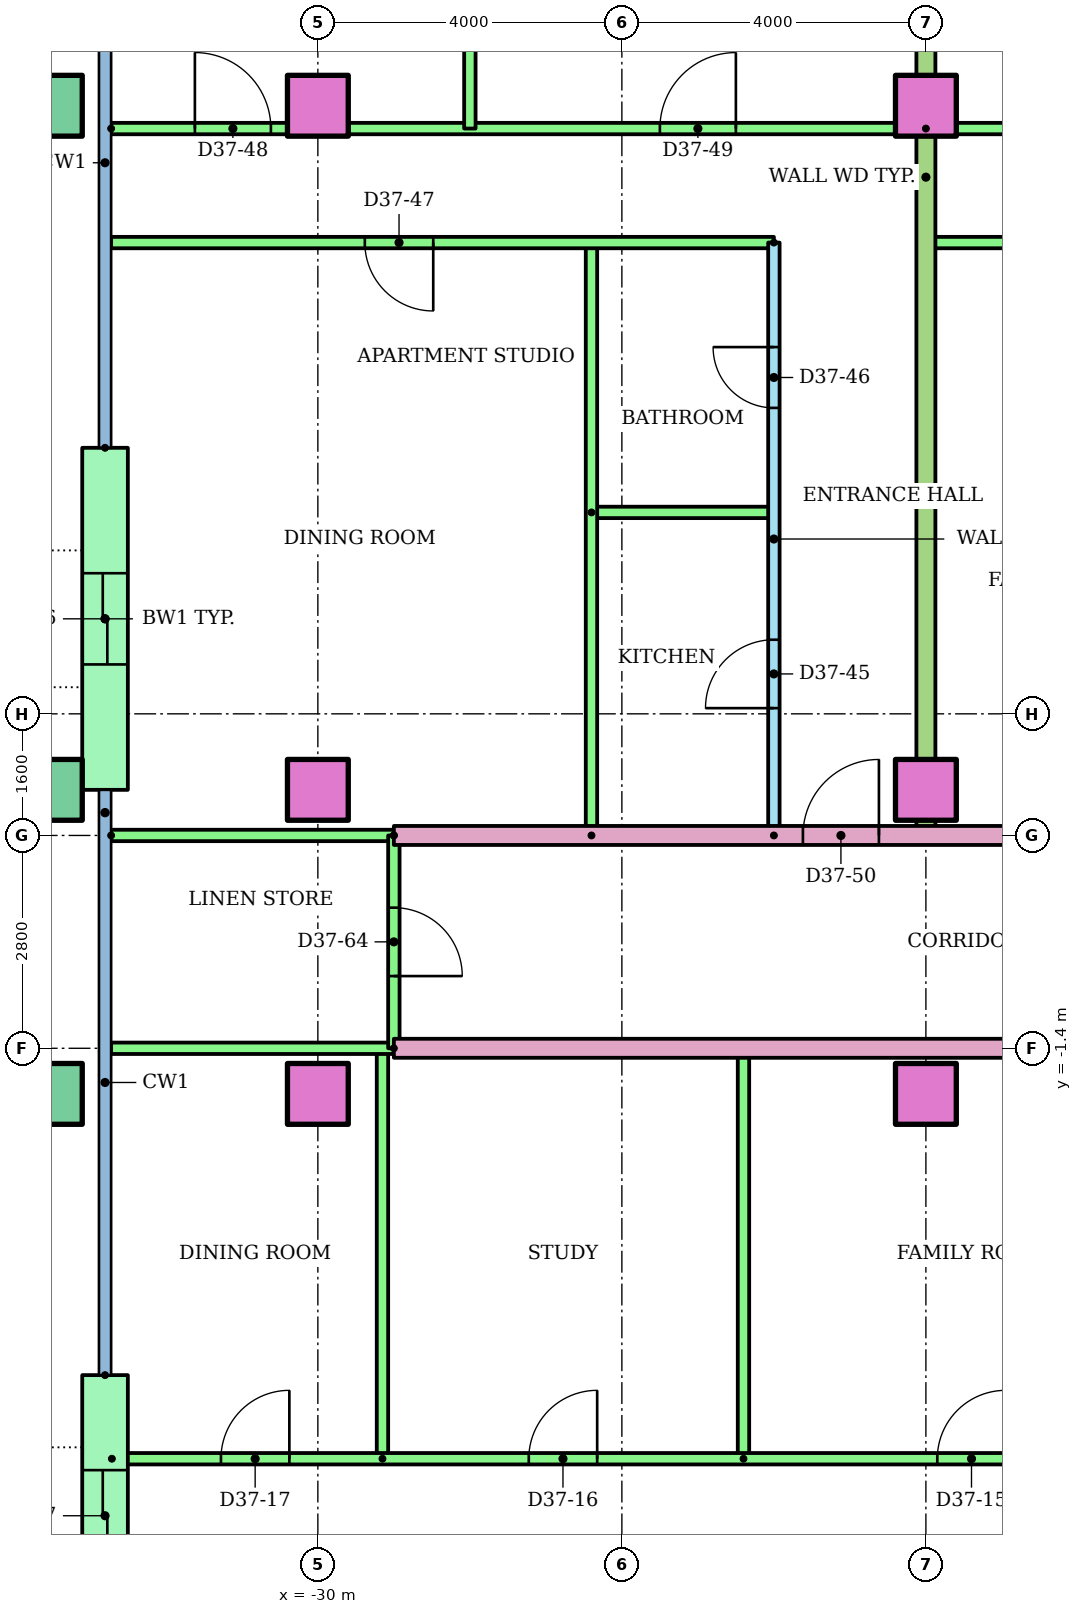
"""IFC4 building model, lengths in metres.
Left out: names, types, materials, properties, quantities, classifications, styles, units other than length and angle.
Written with IfcOpenShell. Run it as: python <this file> out.ifc"""

import sys

from ifc_helpers import new_model, si_unit, direction, frame, frame_2d, origin, origin_2d, place, context, subcontext, project, spatial, rectangle, hollow_rectangle, extrude, element, fill, save


model = new_model("IFC4")
c1 = context("Model", 3, precision=1e-05, world=origin(), true_north=direction((0.0, 1.0)))
c2 = subcontext(c1, "Body", "Model", "MODEL_VIEW")
j1 = project(units=[si_unit("LENGTHUNIT", "METRE"), si_unit("PLANEANGLEUNIT", "RADIAN")], contexts=[c1])
p1 = place(None, origin())
s1 = spatial("IfcSite", under=j1, at=p1, CompositionType="ELEMENT")
p2 = place(p1, origin())
s2 = spatial("IfcBuilding", under=s1, at=p2, CompositionType="ELEMENT")
p3 = place(p2, frame((0.0, 0.0, 142.2)))
s3 = spatial("IfcBuildingStorey", under=s2, at=p3, CompositionType="ELEMENT", Elevation=142.2)
p4 = place(p3, frame((-33.5, -2.0, 0.0)))
e1 = element("IfcColumn", 1, at=p4, inside=s3, PredefinedType="COLUMN", context=c2, shape_type="SweptSolid", body=[
    extrude(hollow_rectangle(XDim=0.8, YDim=0.8, WallThickness=0.04, at=origin_2d()), origin(), (0.0, 0.0, 1.0), 3.2),
])
for number, where in (
    (2, (-30.0, -2.0, 0.0)),
    (3, (-22.0, -2.0, 0.0)),
):
    element("IfcColumn", number, at=place(p3, frame(where)), inside=s3, PredefinedType="COLUMN", context=c2, shape_type="SweptSolid", body=[
        extrude(rectangle(XDim=0.8, YDim=0.8, at=origin_2d()), origin(), (0.0, 0.0, 1.0), 3.2),
    ])
p5 = place(p3, frame((-33.5, 2.0, 0.0)))
e4 = element("IfcColumn", 4, at=p5, inside=s3, PredefinedType="COLUMN", context=c2, shape_type="SweptSolid", body=[
    extrude(hollow_rectangle(XDim=0.8, YDim=0.8, WallThickness=0.04, at=origin_2d()), origin(), (0.0, 0.0, 1.0), 3.2),
])
for number, where in (
    (5, (-30.0, 2.0, 0.0)),
    (6, (-22.0, 2.0, 0.0)),
):
    element("IfcColumn", number, at=place(p3, frame(where)), inside=s3, PredefinedType="COLUMN", context=c2, shape_type="SweptSolid", body=[
        extrude(rectangle(XDim=0.8, YDim=0.8, at=origin_2d()), origin(), (0.0, 0.0, 1.0), 3.2),
    ])
p6 = place(p3, frame((-33.5, 11.0, 0.0)))
e7 = element("IfcColumn", 7, at=p6, inside=s3, PredefinedType="COLUMN", context=c2, shape_type="SweptSolid", body=[
    extrude(hollow_rectangle(XDim=0.8, YDim=0.8, WallThickness=0.04, at=origin_2d()), origin(), (0.0, 0.0, 1.0), 3.2),
])
for number, where in (
    (8, (-30.0, 11.0, 0.0)),
    (9, (-22.0, 11.0, 0.0)),
):
    element("IfcColumn", number, at=place(p3, frame(where)), inside=s3, PredefinedType="COLUMN", context=c2, shape_type="SweptSolid", body=[
        extrude(rectangle(XDim=0.8, YDim=0.8, at=origin_2d()), origin(), (0.0, 0.0, 1.0), 3.2),
    ])
p7 = place(p3, frame((-32.8, 6.5, 0.0), z_axis=(0.0, 0.0, 1.0), x_axis=(0.0, -1.0, 0.0)))
e10 = element("IfcWall", 10, at=p7, inside=s3, PredefinedType="STANDARD", context=c2, shape_type="SweptSolid", body=[
    extrude(rectangle(XDim=4.5, YDim=0.6, at=frame_2d((2.25, 0.0))), origin(), (0.0, 0.0, 1.0), 2.92),
])
p8 = place(p7, frame((1.65, 0.0, 0.0)))
e11 = element("IfcOpeningElement", 11, at=p8, cuts=e10, PredefinedType="OPENING", context=c2, shape_type="SweptSolid", body=[
    extrude(rectangle(XDim=1.2, YDim=2.1, at=frame_2d((0.6, 1.05))), frame((0.0, 0.31, 0.0), z_axis=(0.0, -1.0, 0.0), x_axis=(1.0, 0.0, 0.0)), (0.0, 0.0, 1.0), 0.62),
])
p9 = place(p3, frame((-32.8, -5.7, 0.0), z_axis=(0.0, 0.0, 1.0), x_axis=(0.0, -1.0, 0.0)))
e12 = element("IfcWall", 12, at=p9, inside=s3, PredefinedType="STANDARD", context=c2, shape_type="SweptSolid", body=[
    extrude(rectangle(XDim=3.7, YDim=0.6, at=frame_2d((1.85, 0.0))), origin(), (0.0, 0.0, 1.0), 2.92),
])
p10 = place(p9, frame((1.25, 0.0, 0.0)))
e13 = element("IfcOpeningElement", 13, at=p10, cuts=e12, PredefinedType="OPENING", context=c2, shape_type="SweptSolid", body=[
    extrude(rectangle(XDim=1.2, YDim=2.1, at=frame_2d((0.6, 1.05))), frame((0.0, 0.31, 0.0), z_axis=(0.0, -1.0, 0.0), x_axis=(1.0, 0.0, 0.0)), (0.0, 0.0, 1.0), 0.62),
])
for number, where, z_axis, x_axis in (
    (14, (-24.4, -6.8, 0.0), (0.0, 0.0, 1.0), (0.0, 1.0, 0.0)),
    (15, (-29.15, -6.8, 0.0), (0.0, 0.0, 1.0), (0.0, 1.0, 0.0)),
):
    element("IfcWall", number, at=place(p3, frame(where, z_axis=z_axis, x_axis=x_axis)), inside=s3, PredefinedType="PARTITIONING", context=c2, shape_type="SweptSolid", body=[
        extrude(rectangle(XDim=5.4, YDim=0.15, at=frame_2d((2.7, 0.0))), origin(), (0.0, 0.0, 1.0), 2.4),
    ])
p11 = place(p3, frame((-32.71, -6.8, 0.0)))
e16 = element("IfcWall", 16, at=p11, inside=s3, PredefinedType="PARTITIONING", context=c2, shape_type="SweptSolid", body=[
    extrude(rectangle(XDim=16.71, YDim=0.15, at=frame_2d((8.355, 0.0))), origin(), (0.0, 0.0, 1.0), 2.4),
])
p12 = place(p11, frame((10.86, 0.0, 0.0)))
e17 = element("IfcOpeningElement", 17, at=p12, cuts=e16, PredefinedType="OPENING", context=c2, shape_type="SweptSolid", body=[
    extrude(rectangle(XDim=0.9, YDim=2.1, at=frame_2d((0.45, 1.05))), frame((0.0, 0.085, 0.0), z_axis=(0.0, -1.0, 0.0), x_axis=(1.0, 0.0, 0.0)), (0.0, 0.0, 1.0), 0.17),
])
p13 = place(p11, frame((5.485, 0.0, 0.0)))
e18 = element("IfcOpeningElement", 18, at=p13, cuts=e16, PredefinedType="OPENING", context=c2, shape_type="SweptSolid", body=[
    extrude(rectangle(XDim=0.9, YDim=2.1, at=frame_2d((0.45, 1.05))), frame((0.0, 0.085, 0.0), z_axis=(0.0, -1.0, 0.0), x_axis=(1.0, 0.0, 0.0)), (0.0, 0.0, 1.0), 0.17),
])
p14 = place(p11, frame((1.435, 0.0, 0.0)))
e19 = element("IfcOpeningElement", 19, at=p14, cuts=e16, PredefinedType="OPENING", context=c2, shape_type="SweptSolid", body=[
    extrude(rectangle(XDim=0.9, YDim=2.1, at=frame_2d((0.45, 1.05))), frame((0.0, 0.085, 0.0), z_axis=(0.0, -1.0, 0.0), x_axis=(1.0, 0.0, 0.0)), (0.0, 0.0, 1.0), 0.17),
])
p15 = place(p3, frame((-14.0, -1.4, 0.0), z_axis=(0.0, 0.0, 1.0), x_axis=(-1.0, 0.0, 0.0)))
e20 = element("IfcWall", 20, at=p15, inside=s3, PredefinedType="PARTITIONING", context=c2, shape_type="SweptSolid", body=[
    extrude(rectangle(XDim=15.0, YDim=0.25, at=frame_2d((7.5, 0.0))), origin(), (0.0, 0.0, 1.0), 2.4),
])
p16 = place(p15, frame((0.618, 0.0, 0.0)))
e21 = element("IfcOpeningElement", 21, at=p16, cuts=e20, PredefinedType="OPENING", context=c2, shape_type="SweptSolid", body=[
    extrude(rectangle(XDim=1.0, YDim=2.1, at=frame_2d((0.5, 1.05))), frame((0.0, 0.135, 0.0), z_axis=(0.0, -1.0, 0.0), x_axis=(1.0, 0.0, 0.0)), (0.0, 0.0, 1.0), 0.27),
])
p17 = place(p3, frame((-29.0, -1.4, 0.0), z_axis=(0.0, 0.0, 1.0), x_axis=(-1.0, 0.0, 0.0)))
e22 = element("IfcWall", 22, at=p17, inside=s3, PredefinedType="PARTITIONING", context=c2, shape_type="SweptSolid", body=[
    extrude(rectangle(XDim=3.72, YDim=0.15, at=frame_2d((1.86, 0.0))), origin(), (0.0, 0.0, 1.0), 2.4),
])
p18 = place(p3, frame((-24.0, 1.4, 0.0), z_axis=(0.0, 0.0, 1.0), x_axis=(0.0, 1.0, 0.0)))
e23 = element("IfcWall", 23, at=p18, inside=s3, PredefinedType="PARTITIONING", context=c2, shape_type="SweptSolid", body=[
    extrude(rectangle(XDim=7.8, YDim=0.15, at=frame_2d((3.9, 0.0))), origin(), (0.0, 0.0, 1.0), 2.4),
])
p19 = place(p18, frame((1.675, 0.0, 0.0)))
e24 = element("IfcOpeningElement", 24, at=p19, cuts=e23, PredefinedType="OPENING", context=c2, shape_type="SweptSolid", body=[
    extrude(rectangle(XDim=0.9, YDim=2.1, at=frame_2d((0.45, 1.05))), frame((0.0, 0.085, 0.0), z_axis=(0.0, -1.0, 0.0), x_axis=(1.0, 0.0, 0.0)), (0.0, 0.0, 1.0), 0.17),
])
p20 = place(p18, frame((5.625, 0.0, 0.0)))
e25 = element("IfcOpeningElement", 25, at=p20, cuts=e23, PredefinedType="OPENING", context=c2, shape_type="SweptSolid", body=[
    extrude(rectangle(XDim=0.8, YDim=2.1, at=frame_2d((0.4, 1.05))), frame((0.0, 0.085, 0.0), z_axis=(0.0, -1.0, 0.0), x_axis=(1.0, 0.0, 0.0)), (0.0, 0.0, 1.0), 0.17),
])
p21 = place(p3, frame((-26.4, 5.65, 0.0)))
e26 = element("IfcWall", 26, at=p21, inside=s3, PredefinedType="PARTITIONING", context=c2, shape_type="SweptSolid", body=[
    extrude(rectangle(XDim=2.4, YDim=0.15, at=frame_2d((1.2, 0.0))), origin(), (0.0, 0.0, 1.0), 2.4),
])
p22 = place(p3, frame((-26.4, 1.4, 0.0), z_axis=(0.0, 0.0, 1.0), x_axis=(0.0, 1.0, 0.0)))
e27 = element("IfcWall", 27, at=p22, inside=s3, PredefinedType="PARTITIONING", context=c2, shape_type="SweptSolid", body=[
    extrude(rectangle(XDim=7.8, YDim=0.15, at=frame_2d((3.9, 0.0))), origin(), (0.0, 0.0, 1.0), 2.4),
])
p23 = place(p3, frame((-24.0, 9.2, 0.0), z_axis=(0.0, 0.0, 1.0), x_axis=(-1.0, 0.0, 0.0)))
e28 = element("IfcWall", 28, at=p23, inside=s3, PredefinedType="PARTITIONING", context=c2, shape_type="SweptSolid", body=[
    extrude(rectangle(XDim=8.72, YDim=0.15, at=frame_2d((4.36, 0.0))), origin(), (0.0, 0.0, 1.0), 2.4),
])
p24 = place(p23, frame((4.482, 0.0, 0.0)))
e29 = element("IfcOpeningElement", 29, at=p24, cuts=e28, PredefinedType="OPENING", context=c2, shape_type="SweptSolid", body=[
    extrude(rectangle(XDim=0.9, YDim=2.1, at=frame_2d((0.45, 1.05))), frame((0.0, 0.085, 0.0), z_axis=(0.0, -1.0, 0.0), x_axis=(1.0, 0.0, 0.0)), (0.0, 0.0, 1.0), 0.17),
])
p25 = place(p3, frame((-32.72, 10.7, 0.0)))
e30 = element("IfcWall", 30, at=p25, inside=s3, PredefinedType="PARTITIONING", context=c2, shape_type="SweptSolid", body=[
    extrude(rectangle(XDim=10.72, YDim=0.15, at=frame_2d((5.36, 0.0))), origin(), (0.0, 0.0, 1.0), 2.4),
])
p26 = place(p25, frame((1.102, 0.0, 0.0)))
e31 = element("IfcOpeningElement", 31, at=p26, cuts=e30, PredefinedType="OPENING", context=c2, shape_type="SweptSolid", body=[
    extrude(rectangle(XDim=1.0, YDim=2.1, at=frame_2d((0.5, 1.05))), frame((0.0, 0.085, 0.0), z_axis=(0.0, -1.0, 0.0), x_axis=(1.0, 0.0, 0.0)), (0.0, 0.0, 1.0), 0.17),
])
p27 = place(p25, frame((7.22, 0.0, 0.0)))
e32 = element("IfcOpeningElement", 32, at=p27, cuts=e30, PredefinedType="OPENING", context=c2, shape_type="SweptSolid", body=[
    extrude(rectangle(XDim=1.0, YDim=2.1, at=frame_2d((0.5, 1.05))), frame((0.0, 0.085, 0.0), z_axis=(0.0, -1.0, 0.0), x_axis=(1.0, 0.0, 0.0)), (0.0, 0.0, 1.0), 0.17),
])
p28 = place(p3, frame((-28.0, 16.92, 0.0), z_axis=(0.0, 0.0, 1.0), x_axis=(0.0, -1.0, 0.0)))
e33 = element("IfcWall", 33, at=p28, inside=s3, PredefinedType="PARTITIONING", context=c2, shape_type="SweptSolid", body=[
    extrude(rectangle(XDim=6.22, YDim=0.15, at=frame_2d((3.11, 0.0))), origin(), (0.0, 0.0, 1.0), 2.4),
])
p29 = place(p3, frame((-16.0, 9.2, 0.0), z_axis=(0.0, 0.0, 1.0), x_axis=(-1.0, 0.0, 0.0)))
e34 = element("IfcWall", 34, at=p29, inside=s3, PredefinedType="PARTITIONING", context=c2, shape_type="SweptSolid", body=[
    extrude(rectangle(XDim=6.0, YDim=0.15, at=frame_2d((3.0, 0.0))), origin(), (0.0, 0.0, 1.0), 2.4),
])
p30 = place(p29, frame((3.75, 0.0, 0.0)))
e35 = element("IfcOpeningElement", 35, at=p30, cuts=e34, PredefinedType="OPENING", context=c2, shape_type="SweptSolid", body=[
    extrude(rectangle(XDim=0.9, YDim=2.1, at=frame_2d((0.45, 1.05))), frame((0.0, 0.085, 0.0), z_axis=(0.0, -1.0, 0.0), x_axis=(1.0, 0.0, 0.0)), (0.0, 0.0, 1.0), 0.17),
])
p31 = place(p3, frame((-22.0, 10.7, 0.0)))
e36 = element("IfcWall", 36, at=p31, inside=s3, PredefinedType="PARTITIONING", context=c2, shape_type="SweptSolid", body=[
    extrude(rectangle(XDim=8.0, YDim=0.15, at=frame_2d((4.0, 0.0))), origin(), (0.0, 0.0, 1.0), 2.4),
])
p32 = place(p31, frame((3.5, 0.0, 0.0)))
e37 = element("IfcOpeningElement", 37, at=p32, cuts=e36, PredefinedType="OPENING", context=c2, shape_type="SweptSolid", body=[
    extrude(rectangle(XDim=1.0, YDim=2.1, at=frame_2d((0.5, 1.05))), frame((0.0, 0.085, 0.0), z_axis=(0.0, -1.0, 0.0), x_axis=(1.0, 0.0, 0.0)), (0.0, 0.0, 1.0), 0.17),
])
p33 = place(p3, frame((-22.0, 18.721, 0.0), z_axis=(0.0, 0.0, 1.0), x_axis=(0.0, -1.0, 0.0)))
e38 = element("IfcWall", 38, at=p33, inside=s3, PredefinedType="PARTITIONING", context=c2, shape_type="SweptSolid", body=[
    extrude(rectangle(XDim=17.321, YDim=0.25, at=frame_2d((8.661, 0.0))), origin(), (0.0, 0.0, 1.0), 2.4),
])
p34 = place(p3, frame((-29.0, 1.4, 0.0)))
e39 = element("IfcWall", 39, at=p34, inside=s3, PredefinedType="PARTITIONING", context=c2, shape_type="SweptSolid", body=[
    extrude(rectangle(XDim=15.0, YDim=0.25, at=frame_2d((7.5, 0.0))), origin(), (0.0, 0.0, 1.0), 2.4),
])
p35 = place(p34, frame((5.382, 0.0, 0.0)))
e40 = element("IfcOpeningElement", 40, at=p35, cuts=e39, PredefinedType="OPENING", context=c2, shape_type="SweptSolid", body=[
    extrude(rectangle(XDim=1.0, YDim=2.1, at=frame_2d((0.5, 1.05))), frame((0.0, 0.135, 0.0), z_axis=(0.0, -1.0, 0.0), x_axis=(1.0, 0.0, 0.0)), (0.0, 0.0, 1.0), 0.27),
])
p36 = place(p34, frame((13.5, 0.0, 0.0)))
e41 = element("IfcOpeningElement", 41, at=p36, cuts=e39, PredefinedType="OPENING", context=c2, shape_type="SweptSolid", body=[
    extrude(rectangle(XDim=1.0, YDim=2.1, at=frame_2d((0.5, 1.05))), frame((0.0, 0.135, 0.0), z_axis=(0.0, -1.0, 0.0), x_axis=(1.0, 0.0, 0.0)), (0.0, 0.0, 1.0), 0.27),
])
p37 = place(p3, frame((-32.72, 1.4, 0.0)))
e42 = element("IfcWall", 42, at=p37, inside=s3, PredefinedType="PARTITIONING", context=c2, shape_type="SweptSolid", body=[
    extrude(rectangle(XDim=3.72, YDim=0.15, at=frame_2d((1.86, 0.0))), origin(), (0.0, 0.0, 1.0), 2.4),
])
p38 = place(p3, frame((-29.0, 1.4, 0.0), z_axis=(0.0, 0.0, 1.0), x_axis=(0.0, -1.0, 0.0)))
e43 = element("IfcWall", 43, at=p38, inside=s3, PredefinedType="PARTITIONING", context=c2, shape_type="SweptSolid", body=[
    extrude(rectangle(XDim=2.8, YDim=0.15, at=frame_2d((1.4, 0.0))), origin(), (0.0, 0.0, 1.0), 2.4),
])
p39 = place(p38, frame((0.95, 0.0, 0.0)))
e44 = element("IfcOpeningElement", 44, at=p39, cuts=e43, PredefinedType="OPENING", context=c2, shape_type="SweptSolid", body=[
    extrude(rectangle(XDim=0.9, YDim=2.1, at=frame_2d((0.45, 1.05))), frame((0.0, 0.085, 0.0), z_axis=(0.0, -1.0, 0.0), x_axis=(1.0, 0.0, 0.0)), (0.0, 0.0, 1.0), 0.17),
])
p40 = place(p12, origin())
e45 = element("IfcDoor", 45, at=p40, inside=s3, OperationType="SINGLE_SWING_RIGHT", PredefinedType="DOOR", context=c2, shape_type="SweptSolid", body=[
    extrude(rectangle(XDim=0.9, YDim=2.1, at=frame_2d((0.45, 1.05))), frame((0.0, 0.025, 0.0), z_axis=(0.0, -1.0, 0.0), x_axis=(1.0, 0.0, 0.0)), (0.0, 0.0, 1.0), 0.05),
])
fill(e17, e45)
p41 = place(p13, origin())
e46 = element("IfcDoor", 46, at=p41, inside=s3, OperationType="SINGLE_SWING_RIGHT", PredefinedType="DOOR", context=c2, shape_type="SweptSolid", body=[
    extrude(rectangle(XDim=0.9, YDim=2.1, at=frame_2d((0.45, 1.05))), frame((0.0, 0.025, 0.0), z_axis=(0.0, -1.0, 0.0), x_axis=(1.0, 0.0, 0.0)), (0.0, 0.0, 1.0), 0.05),
])
fill(e18, e46)
p42 = place(p14, origin())
e47 = element("IfcDoor", 47, at=p42, inside=s3, OperationType="SINGLE_SWING_RIGHT", PredefinedType="DOOR", context=c2, shape_type="SweptSolid", body=[
    extrude(rectangle(XDim=0.9, YDim=2.1, at=frame_2d((0.45, 1.05))), frame((0.0, 0.025, 0.0), z_axis=(0.0, -1.0, 0.0), x_axis=(1.0, 0.0, 0.0)), (0.0, 0.0, 1.0), 0.05),
])
fill(e19, e47)
p43 = place(p19, origin())
e48 = element("IfcDoor", 48, at=p43, inside=s3, OperationType="SINGLE_SWING_LEFT", PredefinedType="DOOR", context=c2, shape_type="SweptSolid", body=[
    extrude(rectangle(XDim=0.9, YDim=2.1, at=frame_2d((0.45, 1.05))), frame((0.0, 0.025, 0.0), z_axis=(0.0, -1.0, 0.0), x_axis=(1.0, 0.0, 0.0)), (0.0, 0.0, 1.0), 0.05),
])
fill(e24, e48)
p44 = place(p20, origin())
e49 = element("IfcDoor", 49, at=p44, inside=s3, OperationType="SINGLE_SWING_RIGHT", PredefinedType="DOOR", context=c2, shape_type="SweptSolid", body=[
    extrude(rectangle(XDim=0.8, YDim=2.1, at=frame_2d((0.4, 1.05))), frame((0.0, 0.025, 0.0), z_axis=(0.0, -1.0, 0.0), x_axis=(1.0, 0.0, 0.0)), (0.0, 0.0, 1.0), 0.05),
])
fill(e25, e49)
p45 = place(p24, origin())
e50 = element("IfcDoor", 50, at=p45, inside=s3, OperationType="SINGLE_SWING_LEFT", PredefinedType="DOOR", context=c2, shape_type="SweptSolid", body=[
    extrude(rectangle(XDim=0.9, YDim=2.1, at=frame_2d((0.45, 1.05))), frame((0.0, 0.025, 0.0), z_axis=(0.0, -1.0, 0.0), x_axis=(1.0, 0.0, 0.0)), (0.0, 0.0, 1.0), 0.05),
])
fill(e29, e50)
p46 = place(p26, origin())
e51 = element("IfcDoor", 51, at=p46, inside=s3, OperationType="SINGLE_SWING_LEFT", PredefinedType="DOOR", context=c2, shape_type="SweptSolid", body=[
    extrude(rectangle(XDim=1.0, YDim=2.1, at=frame_2d((0.5, 1.05))), frame((0.0, 0.025, 0.0), z_axis=(0.0, -1.0, 0.0), x_axis=(1.0, 0.0, 0.0)), (0.0, 0.0, 1.0), 0.05),
])
fill(e31, e51)
p47 = place(p27, origin())
e52 = element("IfcDoor", 52, at=p47, inside=s3, OperationType="SINGLE_SWING_RIGHT", PredefinedType="DOOR", context=c2, shape_type="SweptSolid", body=[
    extrude(rectangle(XDim=1.0, YDim=2.1, at=frame_2d((0.5, 1.05))), frame((0.0, 0.025, 0.0), z_axis=(0.0, -1.0, 0.0), x_axis=(1.0, 0.0, 0.0)), (0.0, 0.0, 1.0), 0.05),
])
fill(e32, e52)
p48 = place(p35, origin())
e53 = element("IfcDoor", 53, at=p48, inside=s3, OperationType="SINGLE_SWING_RIGHT", PredefinedType="DOOR", context=c2, shape_type="SweptSolid", body=[
    extrude(rectangle(XDim=1.0, YDim=2.1, at=frame_2d((0.5, 1.05))), frame((0.0, 0.025, 0.0), z_axis=(0.0, -1.0, 0.0), x_axis=(1.0, 0.0, 0.0)), (0.0, 0.0, 1.0), 0.05),
])
fill(e40, e53)
p49 = place(p39, origin())
e54 = element("IfcDoor", 54, at=p49, inside=s3, OperationType="SINGLE_SWING_RIGHT", PredefinedType="DOOR", context=c2, shape_type="SweptSolid", body=[
    extrude(rectangle(XDim=0.9, YDim=2.1, at=frame_2d((0.45, 1.05))), frame((0.0, 0.025, 0.0), z_axis=(0.0, -1.0, 0.0), x_axis=(1.0, 0.0, 0.0)), (0.0, 0.0, 1.0), 0.05),
])
fill(e44, e54)
p50 = place(p8, origin())
e55 = element("IfcDoor", 55, at=p50, inside=s3, OperationType="SLIDING_TO_LEFT", PredefinedType="DOOR", context=c2, shape_type="SweptSolid", body=[
    extrude(rectangle(XDim=1.2, YDim=2.1, at=frame_2d((0.6, 1.05))), frame((0.0, 0.025, 0.0), z_axis=(0.0, -1.0, 0.0), x_axis=(1.0, 0.0, 0.0)), (0.0, 0.0, 1.0), 0.05),
])
fill(e11, e55)
p51 = place(p10, origin())
e56 = element("IfcDoor", 56, at=p51, inside=s3, OperationType="SLIDING_TO_LEFT", PredefinedType="DOOR", context=c2, shape_type="SweptSolid", body=[
    extrude(rectangle(XDim=1.2, YDim=2.1, at=frame_2d((0.6, 1.05))), frame((0.0, 0.025, 0.0), z_axis=(0.0, -1.0, 0.0), x_axis=(1.0, 0.0, 0.0)), (0.0, 0.0, 1.0), 0.05),
])
fill(e13, e56)
save(model, sys.argv[1])
